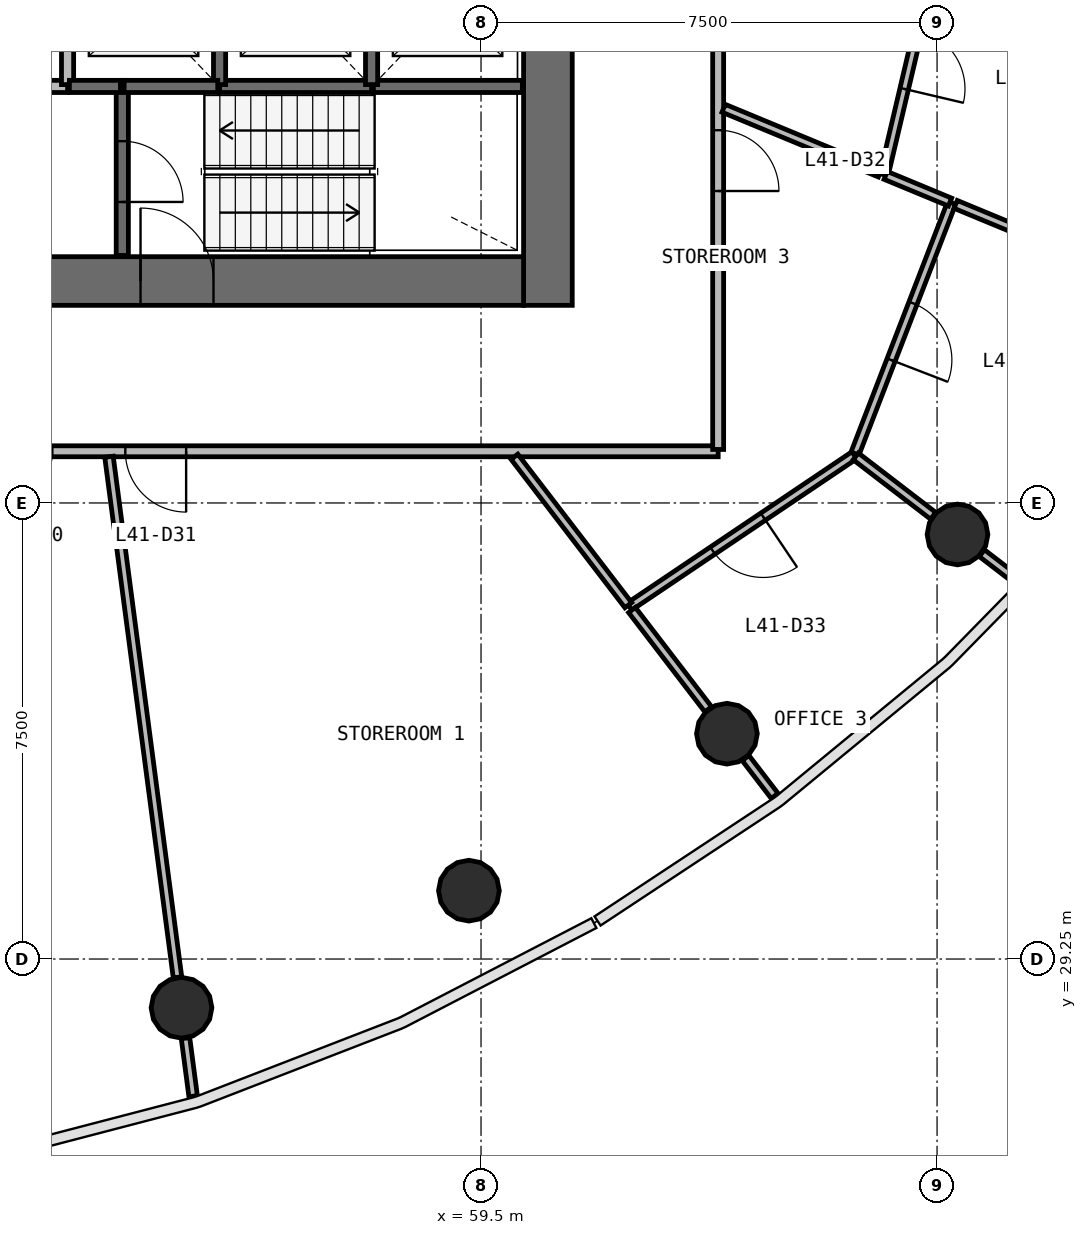
"""IFC4 building model, lengths in metres.
Left out: names, types, materials, properties, quantities, classifications, styles, units other than length and angle.
Written with IfcOpenShell. Run it as: python <this file> out.ifc"""

import sys

from ifc_helpers import new_model, si_unit, direction, frame, frame_2d, origin, origin_2d, place, context, subcontext, project, spatial, rectangle, circle, extrude, source, transform, mapped, element, fill, save


model = new_model("IFC4")
c1 = context("Model", 3, precision=1e-05, world=origin(), true_north=direction((0.0, 1.0)))
c2 = subcontext(c1, "Body", "Model", "MODEL_VIEW")
j1 = project(units=[si_unit("LENGTHUNIT", "METRE"), si_unit("PLANEANGLEUNIT", "RADIAN")], contexts=[c1])
p1 = place(None, origin())
s1 = spatial("IfcSite", under=j1, at=p1, CompositionType="ELEMENT")
p2 = place(p1, origin())
s2 = spatial("IfcBuilding", under=s1, at=p2, CompositionType="ELEMENT")
p3 = place(p2, frame((0.0, 0.0, 172.1)))
s3 = spatial("IfcBuildingStorey", under=s2, at=p3, CompositionType="ELEMENT", Elevation=172.1)
p4 = place(p3, frame((60.6, 40.0, 0.0), z_axis=(0.0, 0.0, 1.0), x_axis=(0.0, 1.0, 0.0)))
e1 = element("IfcWall", 1, at=p4, inside=s3, PredefinedType="SHEAR", context=c2, shape_type="SweptSolid", body=[
    extrude(rectangle(XDim=16.0, YDim=0.8, at=frame_2d((8.0, 0.0))), origin(), (0.0, 0.0, 1.0), 3.9),
])
p5 = place(p4, frame((7.1, 0.0, 0.0)))
e2 = element("IfcOpeningElement", 2, at=p5, cuts=e1, PredefinedType="OPENING", context=c2, shape_type="SweptSolid", body=[
    extrude(rectangle(XDim=1.8, YDim=2.1, at=frame_2d((0.9, 1.05))), frame((0.0, 0.41, 0.0), z_axis=(0.0, -1.0, 0.0), x_axis=(1.0, 0.0, 0.0)), (0.0, 0.0, 1.0), 0.82),
])
p6 = place(p3, frame((43.8, 40.4, 0.0), z_axis=(0.0, 0.0, 1.0), x_axis=(1.0, 0.0, 0.0)))
e3 = element("IfcWall", 3, at=p6, inside=s3, PredefinedType="SHEAR", context=c2, shape_type="SweptSolid", body=[
    extrude(rectangle(XDim=16.4, YDim=0.8, at=frame_2d((8.2, 0.0))), origin(), (0.0, 0.0, 1.0), 3.9),
])
p7 = place(p6, frame((10.1, 0.0, 0.0)))
e4 = element("IfcOpeningElement", 4, at=p7, cuts=e3, PredefinedType="OPENING", context=c2, shape_type="SweptSolid", body=[
    extrude(rectangle(XDim=1.2, YDim=2.1, at=frame_2d((0.6, 1.05))), frame((0.0, 0.41, 0.0), z_axis=(0.0, -1.0, 0.0), x_axis=(1.0, 0.0, 0.0)), (0.0, 0.0, 1.0), 0.82),
])
p8 = place(p6, frame((7.05, 0.0, 0.0)))
e5 = element("IfcOpeningElement", 5, at=p8, cuts=e3, PredefinedType="OPENING", context=c2, shape_type="SweptSolid", body=[
    extrude(rectangle(XDim=1.1, YDim=2.1, at=frame_2d((0.55, 1.05))), frame((0.0, 0.41, 0.0), z_axis=(0.0, -1.0, 0.0), x_axis=(1.0, 0.0, 0.0)), (0.0, 0.0, 1.0), 0.82),
])
p9 = place(p6, frame((0.5, 0.0, 0.0)))
e6 = element("IfcOpeningElement", 6, at=p9, cuts=e3, PredefinedType="OPENING", context=c2, shape_type="SweptSolid", body=[
    extrude(rectangle(XDim=0.8, YDim=2.1, at=frame_2d((0.4, 1.05))), frame((0.0, 0.41, 0.0), z_axis=(0.0, -1.0, 0.0), x_axis=(1.0, 0.0, 0.0)), (0.0, 0.0, 1.0), 0.82),
])
m1 = source(origin(), c2, "Body", "SweptSolid", [
    extrude(circle(Radius=0.5, at=origin_2d()), origin(), (0.0, 0.0, 1.0), 3.9),
])
for number, where, z_axis, x_axis in (
    (7, (54.574, 28.449, 0.0), (0.0, 0.0, 1.0), (1.0, 0.0, 0.0)),
    (8, (59.301, 30.374, 0.0), (0.0, 0.0, 1.0), (1.0, 0.0, 0.0)),
    (9, (63.544, 32.956, 0.0), (0.0, 0.0, 1.0), (1.0, 0.0, 0.0)),
    (10, (67.336, 36.232, 0.0), (0.0, 0.0, 1.0), (1.0, 0.0, 0.0)),
):
    element("IfcColumn", number, at=place(p3, frame(where, z_axis=z_axis, x_axis=x_axis)), inside=s3, PredefinedType="COLUMN", context=c2, shape_type="MappedRepresentation", body=[
        mapped(m1, transform((0.0, 0.0, 0.0), scale=1.0)),
    ])
p10 = place(p3, frame((52.7, 43.6, 0.0), z_axis=(0.0, 0.0, 1.0), x_axis=(-1.0, 0.0, 0.0)))
e11 = element("IfcWall", 11, at=p10, inside=s3, PredefinedType="SOLIDWALL", context=c2, shape_type="SweptSolid", body=[
    extrude(rectangle(XDim=4.8, YDim=0.2, at=frame_2d((2.4, 0.0))), origin(), (0.0, 0.0, 1.0), 3.58),
])
p11 = place(p3, frame((53.6, 43.6, 0.0), z_axis=(0.0, 0.0, 1.0), x_axis=(0.0, -1.0, 0.0)))
e12 = element("IfcWall", 12, at=p11, inside=s3, PredefinedType="SOLIDWALL", context=c2, shape_type="SweptSolid", body=[
    extrude(rectangle(XDim=2.78, YDim=0.2, at=frame_2d((1.39, 0.0))), origin(), (0.0, 0.0, 1.0), 3.58),
])
p12 = place(p11, frame((0.9, 0.0, 0.0)))
e13 = element("IfcOpeningElement", 13, at=p12, cuts=e12, PredefinedType="OPENING", context=c2, shape_type="SweptSolid", body=[
    extrude(rectangle(XDim=1.0, YDim=2.1, at=frame_2d((0.5, 1.05))), frame((0.0, 0.11, 0.0), z_axis=(0.0, -1.0, 0.0), x_axis=(1.0, 0.0, 0.0)), (0.0, 0.0, 1.0), 0.22),
])
p13 = place(p3, frame((55.2, 43.6, 0.0), z_axis=(0.0, 0.0, 1.0), x_axis=(1.0, 0.0, 0.0)))
e14 = element("IfcWall", 14, at=p13, inside=s3, PredefinedType="SOLIDWALL", context=c2, shape_type="SweptSolid", body=[
    extrude(rectangle(XDim=2.5, YDim=0.2, at=frame_2d((1.25, 0.0))), origin(), (0.0, 0.0, 1.0), 3.58),
])
p14 = place(p3, frame((57.73, 43.6, 0.0), z_axis=(0.0, 0.0, 1.0), x_axis=(1.0, 0.0, 0.0)))
e15 = element("IfcWall", 15, at=p14, inside=s3, PredefinedType="SOLIDWALL", context=c2, shape_type="SweptSolid", body=[
    extrude(rectangle(XDim=2.45, YDim=0.2, at=frame_2d((1.225, 0.0))), origin(), (0.0, 0.0, 1.0), 3.58),
])
for number, where, z_axis, x_axis in (
    (16, (52.7, 45.99, 0.0), (0.0, 0.0, 1.0), (0.0, -1.0, 0.0)),
    (17, (55.2, 43.63, 0.0), (0.0, 0.0, 1.0), (0.0, 1.0, 0.0)),
    (18, (57.7, 43.63, 0.0), (0.0, 0.0, 1.0), (0.0, 1.0, 0.0)),
):
    element("IfcWall", number, at=place(p3, frame(where, z_axis=z_axis, x_axis=x_axis)), inside=s3, PredefinedType="SOLIDWALL", context=c2, shape_type="SweptSolid", body=[
        extrude(rectangle(XDim=2.36, YDim=0.2, at=frame_2d((1.18, 0.0))), origin(), (0.0, 0.0, 1.0), 3.58),
    ])
p15 = place(p3, frame((53.63, 43.6, 0.0), z_axis=(0.0, 0.0, 1.0), x_axis=(1.0, 0.0, 0.0)))
e19 = element("IfcWall", 19, at=p15, inside=s3, PredefinedType="SOLIDWALL", context=c2, shape_type="SweptSolid", body=[
    extrude(rectangle(XDim=1.54, YDim=0.2, at=frame_2d((0.77, 0.0))), origin(), (0.0, 0.0, 1.0), 3.58),
])
p16 = place(p3, frame((52.73, 43.6, 0.0), z_axis=(0.0, 0.0, 1.0), x_axis=(1.0, 0.0, 0.0)))
e20 = element("IfcWall", 20, at=p16, inside=s3, PredefinedType="SOLIDWALL", context=c2, shape_type="SweptSolid", body=[
    extrude(rectangle(XDim=0.84, YDim=0.2, at=frame_2d((0.42, 0.0))), origin(), (0.0, 0.0, 1.0), 3.58),
])
p17 = place(p3, frame((63.4, 37.6, 0.0), z_axis=(0.0, 0.0, 1.0), x_axis=(-1.0, 0.0, 0.0)))
e21 = element("IfcWall", 21, at=p17, inside=s3, PredefinedType="PARTITIONING", context=c2, shape_type="SweptSolid", body=[
    extrude(rectangle(XDim=22.8, YDim=0.18, at=frame_2d((11.4, 0.0))), origin(), (0.0, 0.0, 1.0), 2.88),
])
p18 = place(p17, frame((16.15, 0.0, 0.0)))
e22 = element("IfcOpeningElement", 22, at=p18, cuts=e21, PredefinedType="OPENING", context=c2, shape_type="SweptSolid", body=[
    extrude(rectangle(XDim=1.0, YDim=2.1, at=frame_2d((0.5, 1.05))), frame((0.0, 0.1, 0.0), z_axis=(0.0, -1.0, 0.0), x_axis=(1.0, 0.0, 0.0)), (0.0, 0.0, 1.0), 0.2),
])
p19 = place(p17, frame((10.95, 0.0, 0.0)))
e23 = element("IfcOpeningElement", 23, at=p19, cuts=e21, PredefinedType="OPENING", context=c2, shape_type="SweptSolid", body=[
    extrude(rectangle(XDim=1.0, YDim=2.1, at=frame_2d((0.5, 1.05))), frame((0.0, 0.1, 0.0), z_axis=(0.0, -1.0, 0.0), x_axis=(1.0, 0.0, 0.0)), (0.0, 0.0, 1.0), 0.2),
])
p20 = place(p17, frame((8.75, 0.0, 0.0)))
e24 = element("IfcOpeningElement", 24, at=p20, cuts=e21, PredefinedType="OPENING", context=c2, shape_type="SweptSolid", body=[
    extrude(rectangle(XDim=1.0, YDim=2.1, at=frame_2d((0.5, 1.05))), frame((0.0, 0.1, 0.0), z_axis=(0.0, -1.0, 0.0), x_axis=(1.0, 0.0, 0.0)), (0.0, 0.0, 1.0), 0.2),
])
p21 = place(p3, frame((63.4, 58.37, 0.0), z_axis=(0.0, 0.0, 1.0), x_axis=(0.0, -1.0, 0.0)))
e25 = element("IfcWall", 25, at=p21, inside=s3, PredefinedType="PARTITIONING", context=c2, shape_type="SweptSolid", body=[
    extrude(rectangle(XDim=20.74, YDim=0.18, at=frame_2d((10.37, 0.0))), origin(), (0.0, 0.0, 1.0), 2.88),
])
p22 = place(p21, frame((15.49, 0.0, 0.0)))
e26 = element("IfcOpeningElement", 26, at=p22, cuts=e25, PredefinedType="OPENING", context=c2, shape_type="SweptSolid", body=[
    extrude(rectangle(XDim=1.0, YDim=2.1, at=frame_2d((0.5, 1.05))), frame((0.0, 0.1, 0.0), z_axis=(0.0, -1.0, 0.0), x_axis=(1.0, 0.0, 0.0)), (0.0, 0.0, 1.0), 0.2),
])
p23 = place(p21, frame((9.89, 0.0, 0.0)))
e27 = element("IfcOpeningElement", 27, at=p23, cuts=e25, PredefinedType="OPENING", context=c2, shape_type="SweptSolid", body=[
    extrude(rectangle(XDim=1.0, YDim=2.1, at=frame_2d((0.5, 1.05))), frame((0.0, 0.1, 0.0), z_axis=(0.0, -1.0, 0.0), x_axis=(1.0, 0.0, 0.0)), (0.0, 0.0, 1.0), 0.2),
])
p24 = place(p21, frame((7.69, 0.0, 0.0)))
e28 = element("IfcOpeningElement", 28, at=p24, cuts=e25, PredefinedType="OPENING", context=c2, shape_type="SweptSolid", body=[
    extrude(rectangle(XDim=1.0, YDim=2.1, at=frame_2d((0.5, 1.05))), frame((0.0, 0.1, 0.0), z_axis=(0.0, -1.0, 0.0), x_axis=(1.0, 0.0, 0.0)), (0.0, 0.0, 1.0), 0.2),
])
p25 = place(p3, frame((53.381, 37.51, 0.0), z_axis=(0.0, 0.0, 1.0), x_axis=(0.130507901859, -0.991447269174, 0.0)))
e29 = element("IfcWall", 29, at=p25, inside=s3, PredefinedType="PARTITIONING", context=c2, shape_type="SweptSolid", body=[
    extrude(rectangle(XDim=8.635, YDim=0.14, at=frame_2d((4.318, 0.0))), origin(), (0.0, 0.0, 1.0), 2.88),
])
p26 = place(p3, frame((65.639, 37.534, 0.0), z_axis=(0.0, 0.0, 1.0), x_axis=(-0.829726260186, -0.558170523368, 0.0)))
e30 = element("IfcWall", 30, at=p26, inside=s3, PredefinedType="PARTITIONING", context=c2, shape_type="SweptSolid", body=[
    extrude(rectangle(XDim=4.458, YDim=0.14, at=frame_2d((2.229, 0.0))), origin(), (0.0, 0.0, 1.0), 2.88),
])
p27 = place(p26, frame((1.808, 0.0, 0.0)))
e31 = element("IfcOpeningElement", 31, at=p27, cuts=e30, PredefinedType="OPENING", context=c2, shape_type="SweptSolid", body=[
    extrude(rectangle(XDim=1.0, YDim=2.1, at=frame_2d((0.5, 1.05))), frame((0.0, 0.08, 0.0), z_axis=(0.0, -1.0, 0.0), x_axis=(1.0, 0.0, 0.0)), (0.0, 0.0, 1.0), 0.16),
])
p28 = place(p3, frame((67.241, 41.687, 0.0), z_axis=(0.0, 0.0, 1.0), x_axis=(-0.359870694831, -0.933002188101, 0.0)))
e32 = element("IfcWall", 32, at=p28, inside=s3, PredefinedType="PARTITIONING", context=c2, shape_type="SweptSolid", body=[
    extrude(rectangle(XDim=4.421, YDim=0.14, at=frame_2d((2.21, 0.0))), origin(), (0.0, 0.0, 1.0), 2.88),
])
p29 = place(p28, frame((1.771, 0.0, 0.0)))
e33 = element("IfcOpeningElement", 33, at=p29, cuts=e32, PredefinedType="OPENING", context=c2, shape_type="SweptSolid", body=[
    extrude(rectangle(XDim=1.0, YDim=2.1, at=frame_2d((0.5, 1.05))), frame((0.0, 0.08, 0.0), z_axis=(0.0, -1.0, 0.0), x_axis=(1.0, 0.0, 0.0)), (0.0, 0.0, 1.0), 0.16),
])
p30 = place(p3, frame((67.032, 45.991, 0.0), z_axis=(0.0, 0.0, 1.0), x_axis=(-0.229125506444, -0.973396888374, 0.0)))
e34 = element("IfcWall", 34, at=p30, inside=s3, PredefinedType="PARTITIONING", context=c2, shape_type="SweptSolid", body=[
    extrude(rectangle(XDim=3.948, YDim=0.14, at=frame_2d((1.974, 0.0))), origin(), (0.0, 0.0, 1.0), 2.88),
])
p31 = place(p30, frame((1.498, 0.0, 0.0)))
e35 = element("IfcOpeningElement", 35, at=p31, cuts=e34, PredefinedType="OPENING", context=c2, shape_type="SweptSolid", body=[
    extrude(rectangle(XDim=1.0, YDim=2.1, at=frame_2d((0.5, 1.05))), frame((0.0, 0.08, 0.0), z_axis=(0.0, -1.0, 0.0), x_axis=(1.0, 0.0, 0.0)), (0.0, 0.0, 1.0), 0.16),
])
p32 = place(p3, frame((67.306, 41.66, 0.0), z_axis=(0.0, 0.0, 1.0), x_axis=(0.923868420414, -0.38271025824, 0.0)))
e36 = element("IfcWall", 36, at=p32, inside=s3, PredefinedType="PARTITIONING", context=c2, shape_type="SweptSolid", body=[
    extrude(rectangle(XDim=3.168, YDim=0.14, at=frame_2d((1.584, 0.0))), origin(), (0.0, 0.0, 1.0), 2.88),
])
p33 = place(p3, frame((60.049, 37.51, 0.0), z_axis=(0.0, 0.0, 1.0), x_axis=(0.608763032439, -0.793352109933, 0.0)))
e37 = element("IfcWall", 37, at=p33, inside=s3, PredefinedType="PARTITIONING", context=c2, shape_type="SweptSolid", body=[
    extrude(rectangle(XDim=3.076, YDim=0.14, at=frame_2d((1.538, 0.0))), origin(), (0.0, 0.0, 1.0), 2.88),
])
p34 = place(p3, frame((63.49, 43.241, 0.0), z_axis=(0.0, 0.0, 1.0), x_axis=(0.923889630629, -0.382659052443, 0.0)))
e38 = element("IfcWall", 38, at=p34, inside=s3, PredefinedType="PARTITIONING", context=c2, shape_type="SweptSolid", body=[
    extrude(rectangle(XDim=2.784, YDim=0.14, at=frame_2d((1.392, 0.0))), origin(), (0.0, 0.0, 1.0), 2.88),
])
p35 = place(p3, frame((61.983, 34.99, 0.0), z_axis=(0.0, 0.0, 1.0), x_axis=(0.608725109578, -0.79338120785, 0.0)))
e39 = element("IfcWall", 39, at=p35, inside=s3, PredefinedType="PARTITIONING", context=c2, shape_type="SweptSolid", body=[
    extrude(rectangle(XDim=2.06, YDim=0.14, at=frame_2d((1.03, 0.0))), origin(), (0.0, 0.0, 1.0), 2.88),
])
p36 = place(p3, frame((65.663, 37.516, 0.0), z_axis=(0.0, 0.0, 1.0), x_axis=(0.793341796664, -0.608776472661, 0.0)))
e40 = element("IfcWall", 40, at=p36, inside=s3, PredefinedType="PARTITIONING", context=c2, shape_type="SweptSolid", body=[
    extrude(rectangle(XDim=1.604, YDim=0.14, at=frame_2d((0.802, 0.0))), origin(), (0.0, 0.0, 1.0), 2.88),
])
p37 = place(p3, frame((66.155, 42.137, 0.0), z_axis=(0.0, 0.0, 1.0), x_axis=(0.923881792955, -0.382677975126, 0.0)))
e41 = element("IfcWall", 41, at=p37, inside=s3, PredefinedType="PARTITIONING", context=c2, shape_type="SweptSolid", body=[
    extrude(rectangle(XDim=1.146, YDim=0.14, at=frame_2d((0.573, 0.0))), origin(), (0.0, 0.0, 1.0), 2.88),
])
p38 = place(p3, frame((54.64, 27.948, 0.0), z_axis=(0.0, 0.0, 1.0), x_axis=(0.130303682633, -0.991474129916, 0.0)))
e42 = element("IfcWall", 42, at=p38, inside=s3, PredefinedType="PARTITIONING", context=c2, shape_type="SweptSolid", body=[
    extrude(rectangle(XDim=0.963, YDim=0.14, at=frame_2d((0.481, 0.0))), origin(), (0.0, 0.0, 1.0), 2.88),
])
p39 = place(p3, frame((67.737, 35.925, 0.0), z_axis=(0.0, 0.0, 1.0), x_axis=(0.793295559338, -0.608836723215, 0.0)))
e43 = element("IfcWall", 43, at=p39, inside=s3, PredefinedType="PARTITIONING", context=c2, shape_type="SweptSolid", body=[
    extrude(rectangle(XDim=0.797, YDim=0.14, at=frame_2d((0.398, 0.0))), origin(), (0.0, 0.0, 1.0), 2.88),
])
p40 = place(p3, frame((63.851, 32.555, 0.0), z_axis=(0.0, 0.0, 1.0), x_axis=(0.60871867817, -0.793386142334, 0.0)))
e44 = element("IfcWall", 44, at=p40, inside=s3, PredefinedType="PARTITIONING", context=c2, shape_type="SweptSolid", body=[
    extrude(rectangle(XDim=0.785, YDim=0.14, at=frame_2d((0.393, 0.0))), origin(), (0.0, 0.0, 1.0), 2.88),
])
m2 = source(origin(), c2, "Body", "SweptSolid", [
    extrude(rectangle(XDim=1.2, YDim=2.1, at=frame_2d((0.6, 1.05))), frame((0.0, 0.025, 0.0), z_axis=(0.0, -1.0, 0.0), x_axis=(1.0, 0.0, 0.0)), (0.0, 0.0, 1.0), 0.05),
])
p41 = place(p7, origin())
e45 = element("IfcDoor", 45, at=p41, inside=s3, OperationType="SINGLE_SWING_LEFT", PredefinedType="DOOR", context=c2, shape_type="MappedRepresentation", body=[
    mapped(m2, transform((0.0, 0.0, 0.0), scale=1.0)),
])
fill(e4, e45)
m3 = source(origin(), c2, "Body", "SweptSolid", [
    extrude(rectangle(XDim=1.0, YDim=2.1, at=frame_2d((0.5, 1.05))), frame((0.0, 0.025, 0.0), z_axis=(0.0, -1.0, 0.0), x_axis=(1.0, 0.0, 0.0)), (0.0, 0.0, 1.0), 0.05),
])
p42 = place(p12, origin())
e46 = element("IfcDoor", 46, at=p42, inside=s3, OperationType="SINGLE_SWING_RIGHT", PredefinedType="DOOR", context=c2, shape_type="MappedRepresentation", body=[
    mapped(m3, transform((0.0, 0.0, 0.0), scale=1.0)),
])
fill(e13, e46)
m4 = source(origin(), c2, "Body", "SweptSolid", [
    extrude(rectangle(XDim=1.0, YDim=2.1, at=frame_2d((0.5, 1.05))), frame((0.0, 0.025, 0.0), z_axis=(0.0, -1.0, 0.0), x_axis=(1.0, 0.0, 0.0)), (0.0, 0.0, 1.0), 0.05),
])
p43 = place(p20, origin())
e47 = element("IfcDoor", 47, at=p43, inside=s3, OperationType="SINGLE_SWING_LEFT", PredefinedType="DOOR", context=c2, shape_type="MappedRepresentation", body=[
    mapped(m4, transform((0.0, 0.0, 0.0), scale=1.0)),
])
fill(e24, e47)
p44 = place(p22, origin())
e48 = element("IfcDoor", 48, at=p44, inside=s3, OperationType="SINGLE_SWING_RIGHT", PredefinedType="DOOR", context=c2, shape_type="MappedRepresentation", body=[
    mapped(m4, transform((0.0, 0.0, 0.0), scale=1.0)),
])
fill(e26, e48)
p45 = place(p27, origin())
e49 = element("IfcDoor", 49, at=p45, inside=s3, OperationType="SINGLE_SWING_LEFT", PredefinedType="DOOR", context=c2, shape_type="MappedRepresentation", body=[
    mapped(m4, transform((0.0, 0.0, 0.0), scale=1.0)),
])
fill(e31, e49)
p46 = place(p29, origin())
e50 = element("IfcDoor", 50, at=p46, inside=s3, OperationType="SINGLE_SWING_RIGHT", PredefinedType="DOOR", context=c2, shape_type="MappedRepresentation", body=[
    mapped(m4, transform((0.0, 0.0, 0.0), scale=1.0)),
])
fill(e33, e50)
p47 = place(p31, origin())
e51 = element("IfcDoor", 51, at=p47, inside=s3, OperationType="SINGLE_SWING_RIGHT", PredefinedType="DOOR", context=c2, shape_type="MappedRepresentation", body=[
    mapped(m4, transform((0.0, 0.0, 0.0), scale=1.0)),
])
fill(e35, e51)
save(model, sys.argv[1])
